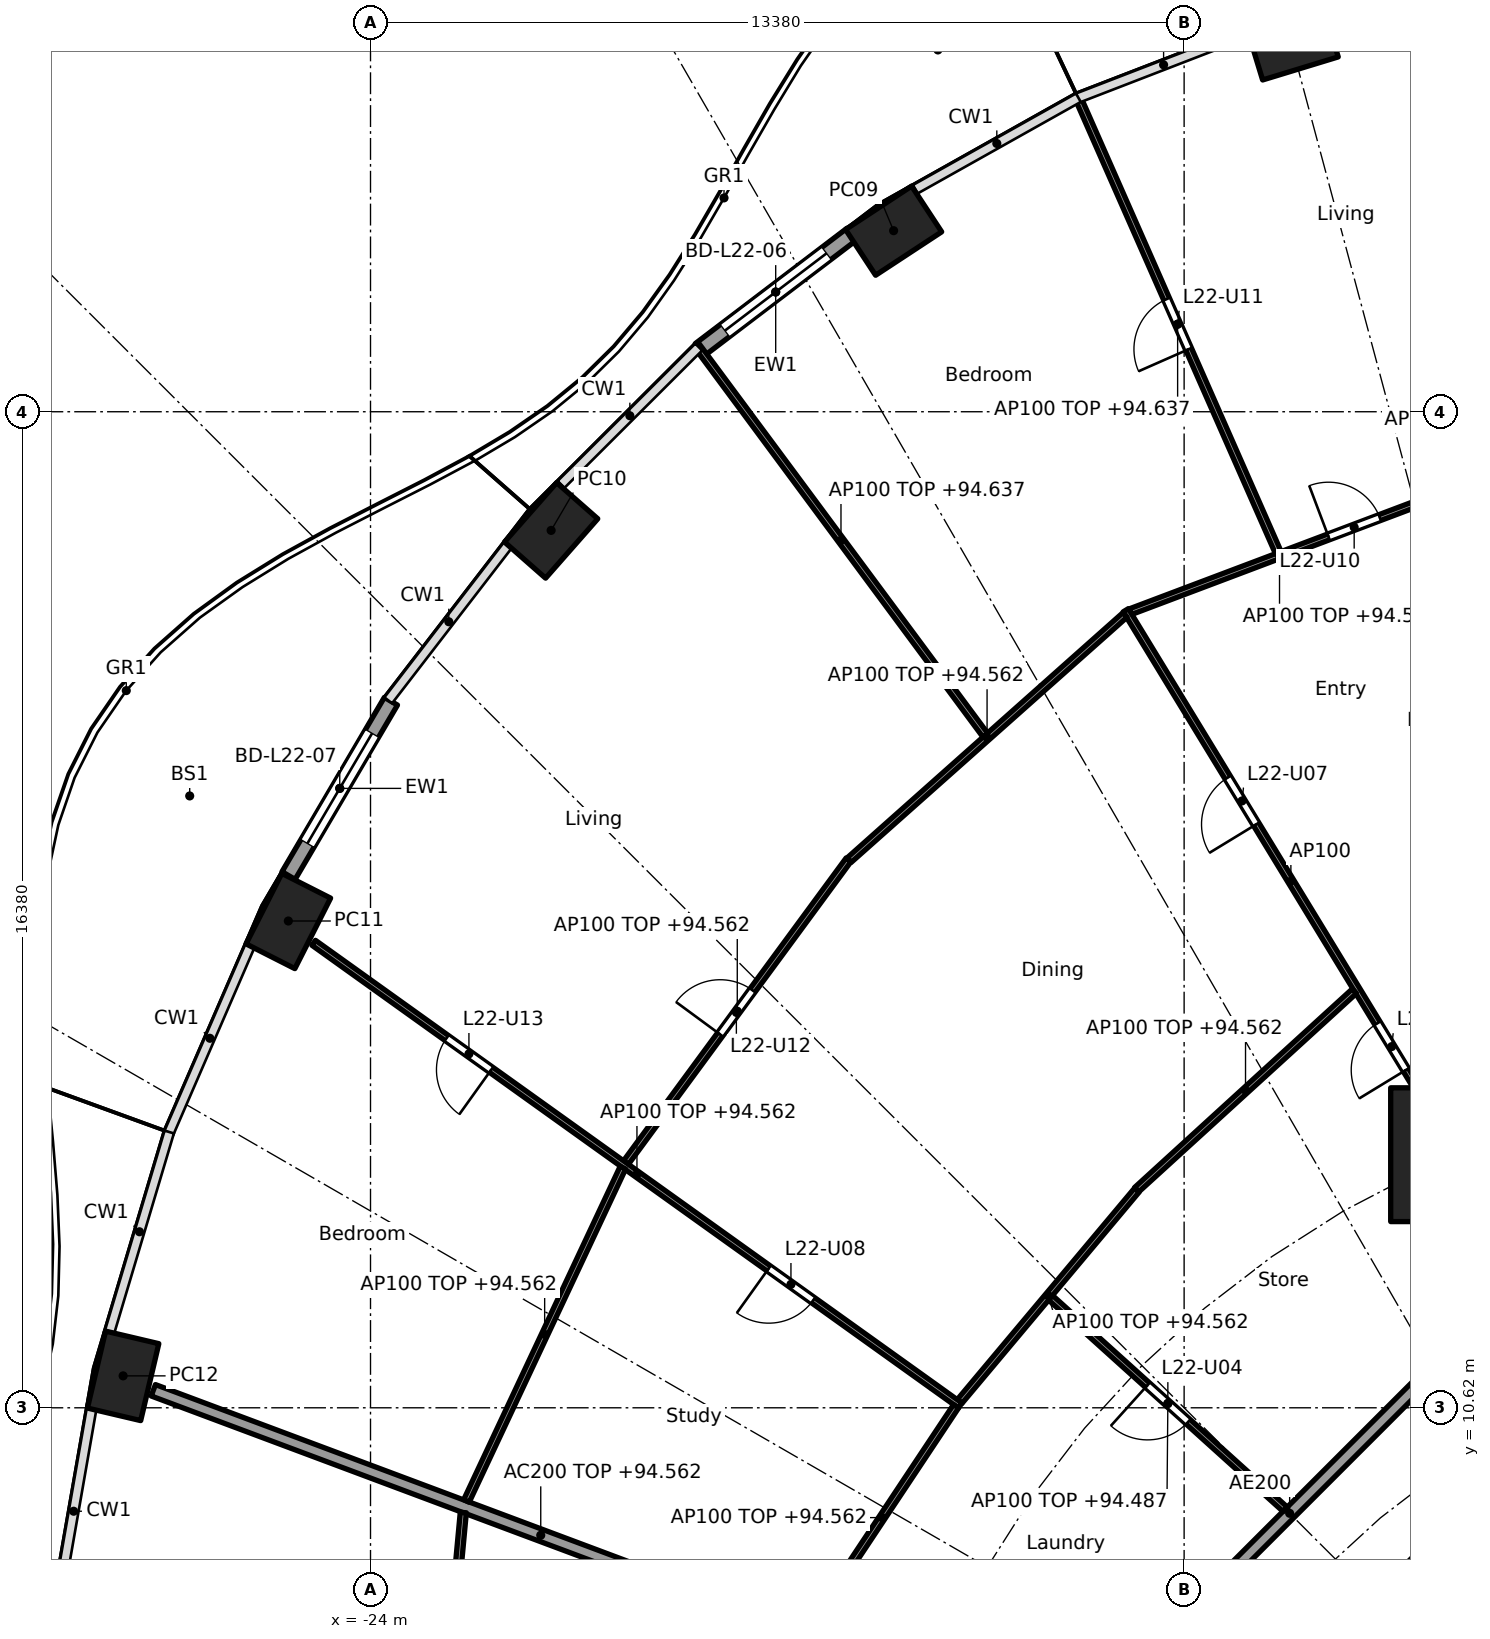
"""IFC4 building model, lengths in metres.
Left out: names, types, materials, properties, quantities, classifications, styles, units other than length and angle.
Written with IfcOpenShell. Run it as: python <this file> out.ifc"""

import sys

from ifc_helpers import new_model, si_unit, direction, frame, frame_2d, origin, origin_2d, place, context, subcontext, project, spatial, rectangle, hollow_rectangle, extrude, element, fill, save


model = new_model("IFC4")
c1 = context("Model", 3, precision=1e-05, world=origin(), true_north=direction((0.0, 1.0)))
c2 = subcontext(c1, "Body", "Model", "MODEL_VIEW")
j1 = project(units=[si_unit("LENGTHUNIT", "METRE"), si_unit("PLANEANGLEUNIT", "RADIAN")], contexts=[c1])
p1 = place(None, origin())
s1 = spatial("IfcSite", under=j1, at=p1, CompositionType="ELEMENT")
p2 = place(p1, origin())
s2 = spatial("IfcBuilding", under=s1, at=p2, CompositionType="ELEMENT")
p3 = place(p2, frame((0.0, 0.0, 91.8)))
s3 = spatial("IfcBuildingStorey", under=s2, at=p3, CompositionType="ELEMENT", Elevation=91.8)
for number, where, z_axis, x_axis in (
    (1, (-8.839, 33.076, 0.0), (0.0, 0.0, 1.0), (-0.957, -0.292, 0.0)),
    (2, (-15.397, 29.978, 0.0), (0.0, 0.0, 1.0), (-0.836, -0.549, 0.0)),
    (3, (-21.03, 25.049, 0.0), (0.0, 0.0, 1.0), (-0.66, -0.751, 0.0)),
    (4, (-25.352, 18.625, 0.0), (0.0, 0.0, 1.0), (-0.452, -0.892, 0.0)),
    (5, (-28.068, 11.145, 0.0), (0.0, 0.0, 1.0), (-0.229, -0.973, 0.0)),
):
    element("IfcColumn", number, at=place(p3, frame(where, z_axis=z_axis, x_axis=x_axis)), inside=s3, PredefinedType="COLUMN", context=c2, shape_type="SweptSolid", body=[
        extrude(hollow_rectangle(XDim=1.3, YDim=0.9, WallThickness=0.045, at=origin_2d()), origin(), (0.0, 0.0, 1.0), 3.7),
    ])
p4 = place(p3, frame((-6.123, 14.782, 0.0), z_axis=(0.0, 0.0, 1.0), x_axis=(1.0, 0.0, 0.0)))
e6 = element("IfcColumn", 6, at=p4, inside=s3, PredefinedType="COLUMN", context=c2, shape_type="SweptSolid", body=[
    extrude(rectangle(XDim=2.2, YDim=2.2, at=origin_2d()), origin(), (0.0, 0.0, 1.0), 3.7),
])
p5 = place(p3, frame((-18.584, 28.021, 0.0), z_axis=(0.0, 0.0, 1.0), x_axis=(0.796037575978, 0.605247203736, 0.0)))
e7 = element("IfcWall", 7, at=p5, inside=s3, PredefinedType="SOLIDWALL", context=c2, shape_type="SweptSolid", body=[
    extrude(rectangle(XDim=3.134, YDim=0.25, at=frame_2d((1.567, 0.0))), origin(), (0.0, 0.0, 1.0), 3.44),
])
p6 = place(p5, frame((0.517, 0.0, 0.0)))
e8 = element("IfcOpeningElement", 8, at=p6, cuts=e7, PredefinedType="OPENING", context=c2, shape_type="SweptSolid", body=[
    extrude(rectangle(XDim=2.1, YDim=2.4, at=frame_2d((1.05, 1.2))), frame((0.0, 0.135, 0.0), z_axis=(0.0, -1.0, 0.0), x_axis=(1.0, 0.0, 0.0)), (0.0, 0.0, 1.0), 0.27),
])
p7 = place(p3, frame((-25.348, 19.372, 0.0), z_axis=(0.0, 0.0, 1.0), x_axis=(0.506352525095, 0.86232657406, 0.0)))
e9 = element("IfcWall", 9, at=p7, inside=s3, PredefinedType="SOLIDWALL", context=c2, shape_type="SweptSolid", body=[
    extrude(rectangle(XDim=3.325, YDim=0.25, at=frame_2d((1.663, 0.0))), origin(), (0.0, 0.0, 1.0), 3.44),
])
p8 = place(p7, frame((0.612, 0.0, 0.0)))
e10 = element("IfcOpeningElement", 10, at=p8, cuts=e9, PredefinedType="OPENING", context=c2, shape_type="SweptSolid", body=[
    extrude(rectangle(XDim=2.1, YDim=2.4, at=frame_2d((1.05, 1.2))), frame((0.0, 0.135, 0.0), z_axis=(0.0, -1.0, 0.0), x_axis=(1.0, 0.0, 0.0)), (0.0, 0.0, 1.0), 0.27),
])
p9 = place(p3, frame((-4.613, 9.988, 0.0), z_axis=(0.0, 0.0, 1.0), x_axis=(-0.707106781187, -0.707106781187, 0.0)))
e11 = element("IfcWall", 11, at=p9, inside=s3, PredefinedType="SHEAR", context=c2, shape_type="SweptSolid", body=[
    extrude(rectangle(XDim=7.602, YDim=0.6, at=frame_2d((3.801, 0.0))), origin(), (0.0, 0.0, 1.0), 3.44),
])
p10 = place(p9, frame((0.351, 0.0, 0.0)))
e12 = element("IfcOpeningElement", 12, at=p10, cuts=e11, PredefinedType="OPENING", context=c2, shape_type="SweptSolid", body=[
    extrude(rectangle(XDim=1.1, YDim=2.1, at=frame_2d((0.55, 1.05))), frame((0.0, 0.31, 0.0), z_axis=(0.0, -1.0, 0.0), x_axis=(1.0, 0.0, 0.0)), (0.0, 0.0, 1.0), 0.62),
])
p11 = place(p3, frame((-14.829, 6.14, 0.0), z_axis=(0.0, 0.0, 1.0), x_axis=(-0.936597324342, 0.35040755134, 0.0)))
e13 = element("IfcWall", 13, at=p11, inside=s3, PredefinedType="PARTITIONING", context=c2, shape_type="SweptSolid", body=[
    extrude(rectangle(XDim=13.606, YDim=0.2, at=frame_2d((6.803, 0.0))), origin(), (0.0, 0.0, 1.0), 2.762),
])
p12 = place(p3, frame((-5.275, 12.494, 0.0), z_axis=(0.0, 0.0, 1.0), x_axis=(-0.707106781187, -0.707106781187, 0.0)))
e14 = element("IfcWall", 14, at=p12, inside=s3, PredefinedType="PARTITIONING", context=c2, shape_type="SweptSolid", body=[
    extrude(rectangle(XDim=10.209, YDim=0.2, at=frame_2d((5.104, 0.0))), origin(), (0.0, 0.0, 1.0), 3.44),
])
p13 = place(p3, frame((-6.596, 25.563, 0.0), z_axis=(0.0, 0.0, 1.0), x_axis=(-0.9356162121, -0.353018843201, 0.0)))
e15 = element("IfcWall", 15, at=p13, inside=s3, PredefinedType="PARTITIONING", context=c2, shape_type="SweptSolid", body=[
    extrude(rectangle(XDim=5.249, YDim=0.1, at=frame_2d((2.625, 0.0))), origin(), (0.0, 0.0, 1.0), 2.762),
])
p14 = place(p13, frame((0.862, 0.0, 0.0)))
e16 = element("IfcOpeningElement", 16, at=p14, cuts=e15, PredefinedType="OPENING", context=c2, shape_type="SweptSolid", body=[
    extrude(rectangle(XDim=0.9, YDim=2.1, at=frame_2d((0.45, 1.05))), frame((0.0, 0.06, 0.0), z_axis=(0.0, -1.0, 0.0), x_axis=(1.0, 0.0, 0.0)), (0.0, 0.0, 1.0), 0.12),
])
p15 = place(p3, frame((-9.072, 24.683, 0.0), z_axis=(0.0, 0.0, 1.0), x_axis=(-0.403192911159, 0.915115007194, 0.0)))
e17 = element("IfcWall", 17, at=p15, inside=s3, PredefinedType="PARTITIONING", context=c2, shape_type="SweptSolid", body=[
    extrude(rectangle(XDim=8.211, YDim=0.1, at=frame_2d((4.106, 0.0))), origin(), (0.0, 0.0, 1.0), 2.837),
])
p16 = place(p15, frame((3.656, 0.0, 0.0)))
e18 = element("IfcOpeningElement", 18, at=p16, cuts=e17, PredefinedType="OPENING", context=c2, shape_type="SweptSolid", body=[
    extrude(rectangle(XDim=0.9, YDim=2.1, at=frame_2d((0.45, 1.05))), frame((0.0, 0.06, 0.0), z_axis=(0.0, -1.0, 0.0), x_axis=(1.0, 0.0, 0.0)), (0.0, 0.0, 1.0), 0.12),
])
p17 = place(p3, frame((-6.149, 14.825, 0.0), z_axis=(0.0, 0.0, 1.0), x_axis=(-0.520411490252, 0.853915616917, 0.0)))
e19 = element("IfcWall", 19, at=p17, inside=s3, PredefinedType="PARTITIONING", context=c2, shape_type="SweptSolid", body=[
    extrude(rectangle(XDim=10.435, YDim=0.1, at=frame_2d((5.218, 0.0))), origin(), (0.0, 0.0, 1.0), 3.44),
])
p18 = place(p17, frame((1.582, 0.0, 0.0)))
e20 = element("IfcOpeningElement", 20, at=p18, cuts=e19, PredefinedType="OPENING", context=c2, shape_type="SweptSolid", body=[
    extrude(rectangle(XDim=0.9, YDim=2.1, at=frame_2d((0.45, 1.05))), frame((0.0, 0.06, 0.0), z_axis=(0.0, -1.0, 0.0), x_axis=(1.0, 0.0, 0.0)), (0.0, 0.0, 1.0), 0.12),
])
p19 = place(p17, frame((6.312, 0.0, 0.0)))
e21 = element("IfcOpeningElement", 21, at=p19, cuts=e19, PredefinedType="OPENING", context=c2, shape_type="SweptSolid", body=[
    extrude(rectangle(XDim=0.9, YDim=2.1, at=frame_2d((0.45, 1.05))), frame((0.0, 0.06, 0.0), z_axis=(0.0, -1.0, 0.0), x_axis=(1.0, 0.0, 0.0)), (0.0, 0.0, 1.0), 0.12),
])
p20 = place(p3, frame((-7.82, 17.472, 0.0), z_axis=(0.0, 0.0, 1.0), x_axis=(-0.73885182489, -0.67386792538, 0.0)))
e22 = element("IfcWall", 22, at=p20, inside=s3, PredefinedType="PARTITIONING", context=c2, shape_type="SweptSolid", body=[
    extrude(rectangle(XDim=4.846, YDim=0.1, at=frame_2d((2.423, 0.0))), origin(), (0.0, 0.0, 1.0), 2.762),
])
p21 = place(p3, frame((-11.591, 23.66, 0.0), z_axis=(0.0, 0.0, 1.0), x_axis=(-0.747429278403, -0.664341383466, 0.0)))
e23 = element("IfcWall", 23, at=p21, inside=s3, PredefinedType="PARTITIONING", context=c2, shape_type="SweptSolid", body=[
    extrude(rectangle(XDim=6.073, YDim=0.1, at=frame_2d((3.037, 0.0))), origin(), (0.0, 0.0, 1.0), 2.762),
])
p22 = place(p3, frame((-13.89, 21.682, 0.0), z_axis=(0.0, 0.0, 1.0), x_axis=(-0.595256113594, 0.803536034804, 0.0)))
e24 = element("IfcWall", 24, at=p22, inside=s3, PredefinedType="PARTITIONING", context=c2, shape_type="SweptSolid", body=[
    extrude(rectangle(XDim=7.972, YDim=0.1, at=frame_2d((3.986, 0.0))), origin(), (0.0, 0.0, 1.0), 2.837),
])
p23 = place(p3, frame((-11.396, 14.202, 0.0), z_axis=(0.0, 0.0, 1.0), x_axis=(-0.642483859922, -0.766299216847, 0.0)))
e25 = element("IfcWall", 25, at=p23, inside=s3, PredefinedType="PARTITIONING", context=c2, shape_type="SweptSolid", body=[
    extrude(rectangle(XDim=4.537, YDim=0.1, at=frame_2d((2.269, 0.0))), origin(), (0.0, 0.0, 1.0), 2.762),
])
p24 = place(p3, frame((-16.138, 19.632, 0.0), z_axis=(0.0, 0.0, 1.0), x_axis=(-0.592401008469, -0.805643249314, 0.0)))
e26 = element("IfcWall", 26, at=p24, inside=s3, PredefinedType="PARTITIONING", context=c2, shape_type="SweptSolid", body=[
    extrude(rectangle(XDim=6.18, YDim=0.1, at=frame_2d((3.09, 0.0))), origin(), (0.0, 0.0, 1.0), 2.762),
])
p25 = place(p24, frame((2.665, 0.0, 0.0)))
e27 = element("IfcOpeningElement", 27, at=p25, cuts=e26, PredefinedType="OPENING", context=c2, shape_type="SweptSolid", body=[
    extrude(rectangle(XDim=0.9, YDim=2.1, at=frame_2d((0.45, 1.05))), frame((0.0, 0.06, 0.0), z_axis=(0.0, -1.0, 0.0), x_axis=(1.0, 0.0, 0.0)), (0.0, 0.0, 1.0), 0.12),
])
p26 = place(p3, frame((-8.959, 8.952, 0.0), z_axis=(0.0, 0.0, 1.0), x_axis=(-0.742686144764, 0.669639672045, 0.0)))
e28 = element("IfcWall", 28, at=p26, inside=s3, PredefinedType="PARTITIONING", context=c2, shape_type="SweptSolid", body=[
    extrude(rectangle(XDim=5.194, YDim=0.1, at=frame_2d((2.597, 0.0))), origin(), (0.0, 0.0, 1.0), 2.687),
])
p27 = place(p26, frame((2.147, 0.0, 0.0)))
e29 = element("IfcOpeningElement", 29, at=p27, cuts=e28, PredefinedType="OPENING", context=c2, shape_type="SweptSolid", body=[
    extrude(rectangle(XDim=0.9, YDim=2.1, at=frame_2d((0.45, 1.05))), frame((0.0, 0.06, 0.0), z_axis=(0.0, -1.0, 0.0), x_axis=(1.0, 0.0, 0.0)), (0.0, 0.0, 1.0), 0.12),
])
p28 = place(p3, frame((-14.302, 10.657, 0.0), z_axis=(0.0, 0.0, 1.0), x_axis=(-0.813183002698, 0.582008079087, 0.0)))
e30 = element("IfcWall", 30, at=p28, inside=s3, PredefinedType="PARTITIONING", context=c2, shape_type="SweptSolid", body=[
    extrude(rectangle(XDim=13.074, YDim=0.1, at=frame_2d((6.537, 0.0))), origin(), (0.0, 0.0, 1.0), 2.762),
])
p29 = place(p28, frame((2.973, 0.0, 0.0)))
e31 = element("IfcOpeningElement", 31, at=p29, cuts=e30, PredefinedType="OPENING", context=c2, shape_type="SweptSolid", body=[
    extrude(rectangle(XDim=0.9, YDim=2.1, at=frame_2d((0.45, 1.05))), frame((0.0, 0.06, 0.0), z_axis=(0.0, -1.0, 0.0), x_axis=(1.0, 0.0, 0.0)), (0.0, 0.0, 1.0), 0.12),
])
p30 = place(p28, frame((9.485, 0.0, 0.0)))
e32 = element("IfcOpeningElement", 32, at=p30, cuts=e30, PredefinedType="OPENING", context=c2, shape_type="SweptSolid", body=[
    extrude(rectangle(XDim=0.9, YDim=2.1, at=frame_2d((0.45, 1.05))), frame((0.0, 0.06, 0.0), z_axis=(0.0, -1.0, 0.0), x_axis=(1.0, 0.0, 0.0)), (0.0, 0.0, 1.0), 0.12),
])
p31 = place(p3, frame((-14.371, 10.645, 0.0), z_axis=(0.0, 0.0, 1.0), x_axis=(-0.553341009285, -0.832954817168, 0.0)))
e33 = element("IfcWall", 33, at=p31, inside=s3, PredefinedType="PARTITIONING", context=c2, shape_type="SweptSolid", body=[
    extrude(rectangle(XDim=4.396, YDim=0.1, at=frame_2d((2.198, 0.0))), origin(), (0.0, 0.0, 1.0), 2.762),
])
p32 = place(p3, frame((-19.85, 14.567, 0.0), z_axis=(0.0, 0.0, 1.0), x_axis=(-0.424942210745, -0.905220480064, 0.0)))
e34 = element("IfcWall", 34, at=p32, inside=s3, PredefinedType="PARTITIONING", context=c2, shape_type="SweptSolid", body=[
    extrude(rectangle(XDim=6.053, YDim=0.1, at=frame_2d((3.027, 0.0))), origin(), (0.0, 0.0, 1.0), 2.762),
])
p33 = place(p3, frame((-22.474, 8.898, 0.0), z_axis=(0.0, 0.0, 1.0), x_axis=(-0.092756864489, -0.995688788774, 0.0)))
e35 = element("IfcWall", 35, at=p33, inside=s3, PredefinedType="PARTITIONING", context=c2, shape_type="SweptSolid", body=[
    extrude(rectangle(XDim=6.283, YDim=0.1, at=frame_2d((3.141, 0.0))), origin(), (0.0, 0.0, 1.0), 2.762),
])
p34 = place(p33, frame((4.25, 0.0, 0.0)))
e36 = element("IfcOpeningElement", 36, at=p34, cuts=e35, PredefinedType="OPENING", context=c2, shape_type="SweptSolid", body=[
    extrude(rectangle(XDim=0.9, YDim=2.1, at=frame_2d((0.45, 1.05))), frame((0.0, 0.06, 0.0), z_axis=(0.0, -1.0, 0.0), x_axis=(1.0, 0.0, 0.0)), (0.0, 0.0, 1.0), 0.12),
])
p35 = place(p6, origin())
e37 = element("IfcDoor", 37, at=p35, inside=s3, OperationType="SLIDING_TO_LEFT", PredefinedType="DOOR", context=c2, shape_type="SweptSolid", body=[
    extrude(rectangle(XDim=2.1, YDim=2.4, at=frame_2d((1.05, 1.2))), frame((0.0, 0.025, 0.0), z_axis=(0.0, -1.0, 0.0), x_axis=(1.0, 0.0, 0.0)), (0.0, 0.0, 1.0), 0.05),
])
fill(e8, e37)
p36 = place(p8, origin())
e38 = element("IfcDoor", 38, at=p36, inside=s3, OperationType="SLIDING_TO_LEFT", PredefinedType="DOOR", context=c2, shape_type="SweptSolid", body=[
    extrude(rectangle(XDim=2.1, YDim=2.4, at=frame_2d((1.05, 1.2))), frame((0.0, 0.025, 0.0), z_axis=(0.0, -1.0, 0.0), x_axis=(1.0, 0.0, 0.0)), (0.0, 0.0, 1.0), 0.05),
])
fill(e10, e38)
p37 = place(p18, origin())
e39 = element("IfcDoor", 39, at=p37, inside=s3, OperationType="SINGLE_SWING_LEFT", PredefinedType="DOOR", context=c2, shape_type="SweptSolid", body=[
    extrude(rectangle(XDim=0.9, YDim=2.1, at=frame_2d((0.45, 1.05))), frame((0.0, 0.025, 0.0), z_axis=(0.0, -1.0, 0.0), x_axis=(1.0, 0.0, 0.0)), (0.0, 0.0, 1.0), 0.05),
])
fill(e20, e39)
p38 = place(p27, origin())
e40 = element("IfcDoor", 40, at=p38, inside=s3, OperationType="SINGLE_SWING_RIGHT", PredefinedType="DOOR", context=c2, shape_type="SweptSolid", body=[
    extrude(rectangle(XDim=0.9, YDim=2.1, at=frame_2d((0.45, 1.05))), frame((0.0, 0.025, 0.0), z_axis=(0.0, -1.0, 0.0), x_axis=(1.0, 0.0, 0.0)), (0.0, 0.0, 1.0), 0.05),
])
fill(e29, e40)
p39 = place(p19, origin())
e41 = element("IfcDoor", 41, at=p39, inside=s3, OperationType="SINGLE_SWING_LEFT", PredefinedType="DOOR", context=c2, shape_type="SweptSolid", body=[
    extrude(rectangle(XDim=0.9, YDim=2.1, at=frame_2d((0.45, 1.05))), frame((0.0, 0.025, 0.0), z_axis=(0.0, -1.0, 0.0), x_axis=(1.0, 0.0, 0.0)), (0.0, 0.0, 1.0), 0.05),
])
fill(e21, e41)
p40 = place(p29, origin())
e42 = element("IfcDoor", 42, at=p40, inside=s3, OperationType="SINGLE_SWING_RIGHT", PredefinedType="DOOR", context=c2, shape_type="SweptSolid", body=[
    extrude(rectangle(XDim=0.9, YDim=2.1, at=frame_2d((0.45, 1.05))), frame((0.0, 0.025, 0.0), z_axis=(0.0, -1.0, 0.0), x_axis=(1.0, 0.0, 0.0)), (0.0, 0.0, 1.0), 0.05),
])
fill(e31, e42)
p41 = place(p14, frame((0.9, 0.0, 0.0), x_axis=(-1.0, 0.0, 0.0)))
e43 = element("IfcDoor", 43, at=p41, inside=s3, OperationType="SINGLE_SWING_LEFT", PredefinedType="DOOR", context=c2, shape_type="SweptSolid", body=[
    extrude(rectangle(XDim=0.9, YDim=2.1, at=frame_2d((0.45, 1.05))), frame((0.0, 0.025, 0.0), z_axis=(0.0, -1.0, 0.0), x_axis=(1.0, 0.0, 0.0)), (0.0, 0.0, 1.0), 0.05),
])
fill(e16, e43)
p42 = place(p16, origin())
e44 = element("IfcDoor", 44, at=p42, inside=s3, OperationType="SINGLE_SWING_LEFT", PredefinedType="DOOR", context=c2, shape_type="SweptSolid", body=[
    extrude(rectangle(XDim=0.9, YDim=2.1, at=frame_2d((0.45, 1.05))), frame((0.0, 0.025, 0.0), z_axis=(0.0, -1.0, 0.0), x_axis=(1.0, 0.0, 0.0)), (0.0, 0.0, 1.0), 0.05),
])
fill(e18, e44)
p43 = place(p25, frame((0.9, 0.0, 0.0), x_axis=(-1.0, 0.0, 0.0)))
e45 = element("IfcDoor", 45, at=p43, inside=s3, OperationType="SINGLE_SWING_LEFT", PredefinedType="DOOR", context=c2, shape_type="SweptSolid", body=[
    extrude(rectangle(XDim=0.9, YDim=2.1, at=frame_2d((0.45, 1.05))), frame((0.0, 0.025, 0.0), z_axis=(0.0, -1.0, 0.0), x_axis=(1.0, 0.0, 0.0)), (0.0, 0.0, 1.0), 0.05),
])
fill(e27, e45)
p44 = place(p30, origin())
e46 = element("IfcDoor", 46, at=p44, inside=s3, OperationType="SINGLE_SWING_LEFT", PredefinedType="DOOR", context=c2, shape_type="SweptSolid", body=[
    extrude(rectangle(XDim=0.9, YDim=2.1, at=frame_2d((0.45, 1.05))), frame((0.0, 0.025, 0.0), z_axis=(0.0, -1.0, 0.0), x_axis=(1.0, 0.0, 0.0)), (0.0, 0.0, 1.0), 0.05),
])
fill(e32, e46)
save(model, sys.argv[1])
